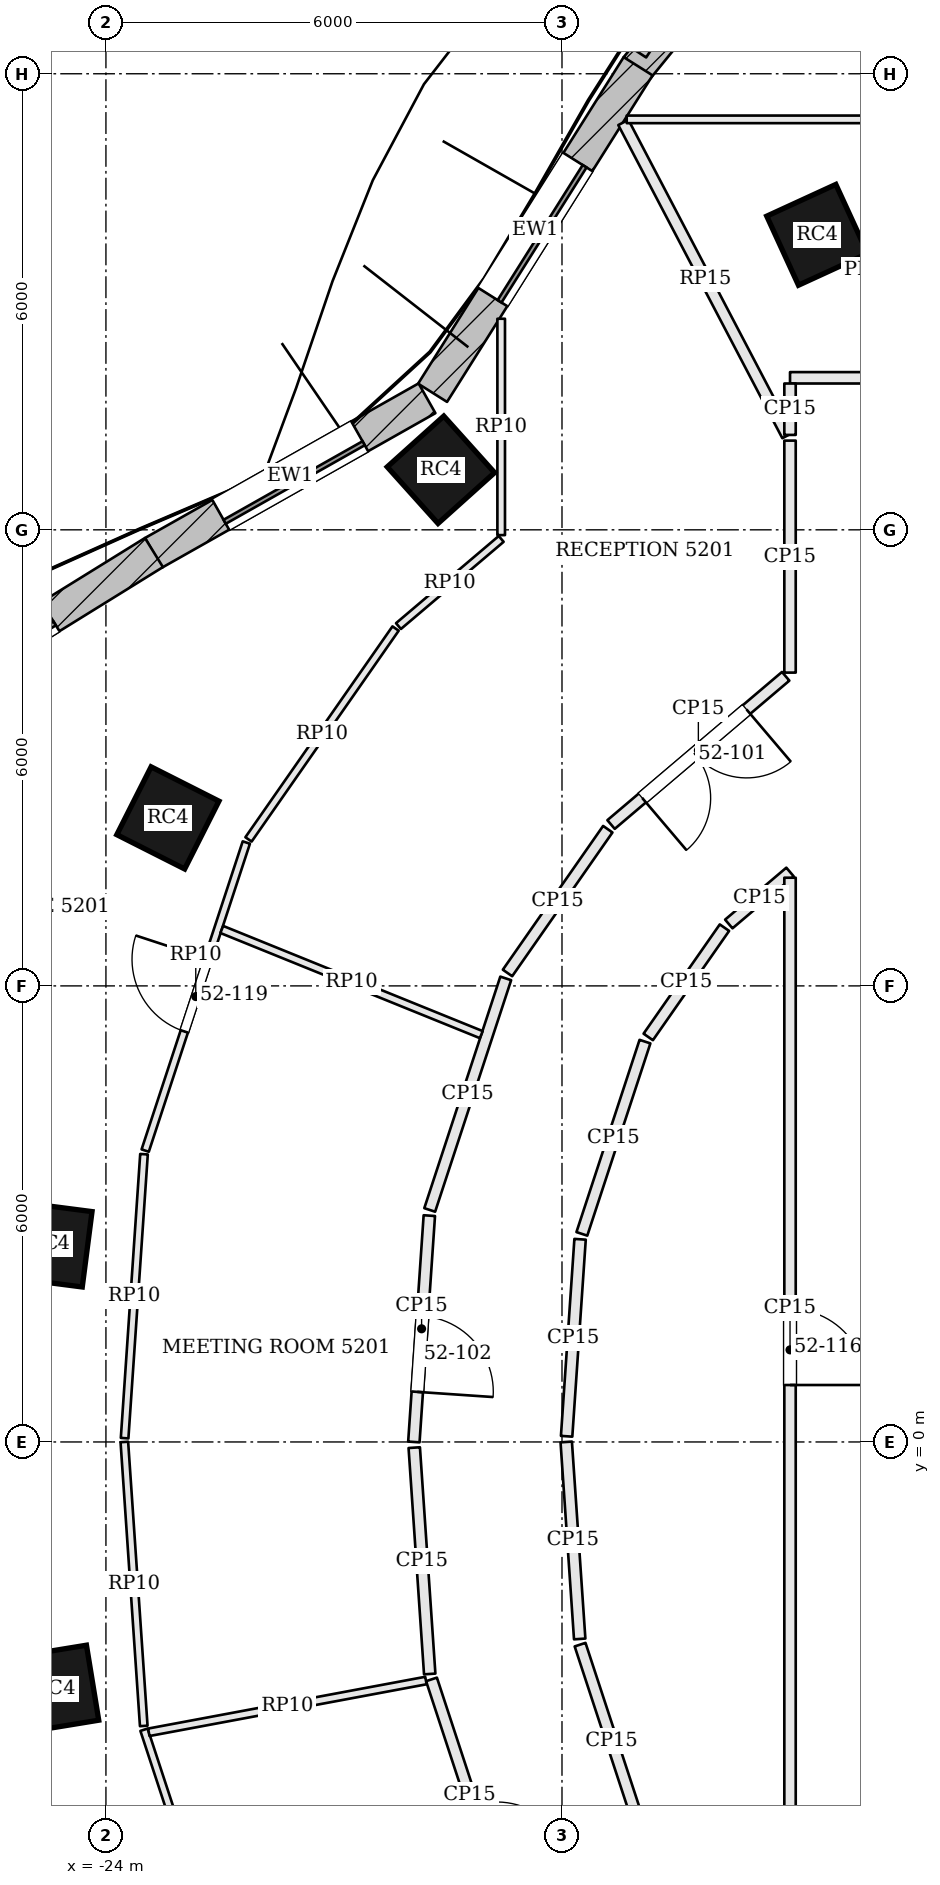
"""IFC4 building model, lengths in metres.
Left out: names, types, materials, properties, quantities, classifications, styles, units other than length and angle.
Written with IfcOpenShell. Run it as: python <this file> out.ifc"""

import sys

from ifc_helpers import new_model, si_unit, direction, frame, frame_2d, origin, origin_2d, place, context, subcontext, project, spatial, rectangle, extrude, element, fill, save


model = new_model("IFC4")
c1 = context("Model", 3, precision=1e-05, world=origin(), true_north=direction((0.0, 1.0)))
c2 = subcontext(c1, "Body", "Model", "MODEL_VIEW")
j1 = project(units=[si_unit("LENGTHUNIT", "METRE"), si_unit("PLANEANGLEUNIT", "RADIAN")], contexts=[c1])
p1 = place(None, origin())
s1 = spatial("IfcSite", under=j1, at=p1, CompositionType="ELEMENT")
p2 = place(p1, origin())
s2 = spatial("IfcBuilding", under=s1, at=p2, CompositionType="ELEMENT")
p3 = place(p2, frame((0.0, 0.0, 213.0)))
s3 = spatial("IfcBuildingStorey", under=s2, at=p3, CompositionType="ELEMENT", Elevation=213.0)
for number, where, z_axis, x_axis in (
    (1, (-14.643, 15.881, 0.0), (0.0, 0.0, 1.0), (-0.909, -0.417, 0.0)),
    (2, (-19.593, 12.79, 0.0), (0.0, 0.0, 1.0), (-0.744, -0.668, 0.0)),
    (3, (-23.185, 8.21, 0.0), (0.0, 0.0, 1.0), (-0.451, -0.893, 0.0)),
    (4, (-24.743, 2.599, 0.0), (0.0, 0.0, 1.0), (-0.128, -0.992, 0.0)),
    (5, (-24.669, -3.248, 0.0), (0.0, 0.0, 1.0), (0.162, -0.987, 0.0)),
):
    element("IfcColumn", number, at=place(p3, frame(where, z_axis=z_axis, x_axis=x_axis)), inside=s3, PredefinedType="COLUMN", context=c2, shape_type="SweptSolid", body=[
        extrude(rectangle(XDim=1.0, YDim=1.0, at=origin_2d()), origin(), (0.0, 0.0, 1.0), 3.9),
    ])
p4 = place(p3, frame((-14.926, 20.641, 0.0), z_axis=(0.0, 0.0, 1.0), x_axis=(-0.631548074669, -0.775336720001, 0.0)))
e6 = element("IfcWall", 6, at=p4, inside=s3, PredefinedType="SOLIDWALL", context=c2, shape_type="SweptSolid", body=[
    extrude(rectangle(XDim=3.308, YDim=0.45, at=frame_2d((1.654, 0.0))), origin(), (0.0, 0.0, 1.0), 3.6),
])
p5 = place(p4, frame((0.604, 0.0, 0.9)))
e7 = element("IfcOpeningElement", 7, at=p5, cuts=e6, PredefinedType="OPENING", context=c2, shape_type="SweptSolid", body=[
    extrude(rectangle(XDim=2.1, YDim=1.8, at=frame_2d((1.05, 0.9))), frame((0.0, 0.235, 0.0), z_axis=(0.0, -1.0, 0.0), x_axis=(1.0, 0.0, 0.0)), (0.0, 0.0, 1.0), 0.47),
])
p6 = place(p3, frame((-16.998, 18.099, 0.0), z_axis=(0.0, 0.0, 1.0), x_axis=(-0.532745661304, -0.846275404559, 0.0)))
e8 = element("IfcWall", 8, at=p6, inside=s3, PredefinedType="SOLIDWALL", context=c2, shape_type="SweptSolid", body=[
    extrude(rectangle(XDim=5.076, YDim=0.45, at=frame_2d((2.538, 0.0))), origin(), (0.0, 0.0, 1.0), 3.6),
])
p7 = place(p6, frame((1.488, 0.0, 0.9)))
e9 = element("IfcOpeningElement", 9, at=p7, cuts=e8, PredefinedType="OPENING", context=c2, shape_type="SweptSolid", body=[
    extrude(rectangle(XDim=2.1, YDim=1.8, at=frame_2d((1.05, 0.9))), frame((0.0, 0.235, 0.0), z_axis=(0.0, -1.0, 0.0), x_axis=(1.0, 0.0, 0.0)), (0.0, 0.0, 1.0), 0.47),
])
p8 = place(p3, frame((-19.776, 13.731, 0.0), z_axis=(0.0, 0.0, 1.0), x_axis=(-0.870610133829, -0.491973571318, 0.0)))
e10 = element("IfcWall", 10, at=p8, inside=s3, PredefinedType="SOLIDWALL", context=c2, shape_type="SweptSolid", body=[
    extrude(rectangle(XDim=4.134, YDim=0.45, at=frame_2d((2.067, 0.0))), origin(), (0.0, 0.0, 1.0), 3.6),
])
p9 = place(p8, frame((1.017, 0.0, 0.9)))
e11 = element("IfcOpeningElement", 11, at=p9, cuts=e10, PredefinedType="OPENING", context=c2, shape_type="SweptSolid", body=[
    extrude(rectangle(XDim=2.1, YDim=1.8, at=frame_2d((1.05, 0.9))), frame((0.0, 0.235, 0.0), z_axis=(0.0, -1.0, 0.0), x_axis=(1.0, 0.0, 0.0)), (0.0, 0.0, 1.0), 0.47),
])
p10 = place(p3, frame((-23.368, 11.701, 0.0), z_axis=(0.0, 0.0, 1.0), x_axis=(-0.850251408633, -0.526376806211, 0.0)))
e12 = element("IfcWall", 12, at=p10, inside=s3, PredefinedType="SOLIDWALL", context=c2, shape_type="SweptSolid", body=[
    extrude(rectangle(XDim=5.302, YDim=0.45, at=frame_2d((2.651, 0.0))), origin(), (0.0, 0.0, 1.0), 3.6),
])
p11 = place(p10, frame((1.601, 0.0, 0.9)))
e13 = element("IfcOpeningElement", 13, at=p11, cuts=e12, PredefinedType="OPENING", context=c2, shape_type="SweptSolid", body=[
    extrude(rectangle(XDim=2.1, YDim=1.8, at=frame_2d((1.05, 0.9))), frame((0.0, 0.235, 0.0), z_axis=(0.0, -1.0, 0.0), x_axis=(1.0, 0.0, 0.0)), (0.0, 0.0, 1.0), 0.47),
])
p12 = place(p3, frame((-16.838, 18.298, 0.0), z_axis=(0.0, 0.0, 1.0), x_axis=(-0.835871900419, 0.548924554097, 0.0)))
e14 = element("IfcWall", 14, at=p12, inside=s3, PredefinedType="SOLIDWALL", context=c2, shape_type="SweptSolid", body=[
    extrude(rectangle(XDim=1.75, YDim=0.2, at=frame_2d((0.875, 0.0))), origin(), (0.0, 0.0, 1.0), 3.6),
])
p13 = place(p3, frame((-15.0, 13.174, 0.0), z_axis=(0.0, 0.0, 1.0), x_axis=(0.0, -1.0, 0.0)))
e15 = element("IfcWall", 15, at=p13, inside=s3, PredefinedType="PARTITIONING", context=c2, shape_type="SweptSolid", body=[
    extrude(rectangle(XDim=3.052, YDim=0.15, at=frame_2d((1.526, 0.0))), origin(), (0.0, 0.0, 1.0), 2.984),
])
p14 = place(p3, frame((-15.057, 10.073, 0.0), z_axis=(0.0, 0.0, 1.0), x_axis=(-0.762398905861, -0.647107339119, 0.0)))
e16 = element("IfcWall", 16, at=p14, inside=s3, PredefinedType="PARTITIONING", context=c2, shape_type="SweptSolid", body=[
    extrude(rectangle(XDim=3.013, YDim=0.15, at=frame_2d((1.507, 0.0))), origin(), (0.0, 0.0, 1.0), 2.984),
])
p15 = place(p14, frame((0.675, 0.0, 0.0)))
e17 = element("IfcOpeningElement", 17, at=p15, cuts=e16, PredefinedType="OPENING", context=c2, shape_type="SweptSolid", body=[
    extrude(rectangle(XDim=1.8, YDim=2.1, at=frame_2d((0.9, 1.05))), frame((0.0, 0.085, 0.0), z_axis=(0.0, -1.0, 0.0), x_axis=(1.0, 0.0, 0.0)), (0.0, 0.0, 1.0), 0.17),
])
p16 = place(p3, frame((-17.397, 8.062, 0.0), z_axis=(0.0, 0.0, 1.0), x_axis=(-0.572118665737, -0.820170855563, 0.0)))
e18 = element("IfcWall", 18, at=p16, inside=s3, PredefinedType="PARTITIONING", context=c2, shape_type="SweptSolid", body=[
    extrude(rectangle(XDim=2.306, YDim=0.15, at=frame_2d((1.153, 0.0))), origin(), (0.0, 0.0, 1.0), 2.984),
])
p17 = place(p3, frame((-18.74, 6.099, 0.0), z_axis=(0.0, 0.0, 1.0), x_axis=(-0.31188427026, -0.950120098706, 0.0)))
e19 = element("IfcWall", 19, at=p17, inside=s3, PredefinedType="PARTITIONING", context=c2, shape_type="SweptSolid", body=[
    extrude(rectangle(XDim=3.206, YDim=0.15, at=frame_2d((1.603, 0.0))), origin(), (0.0, 0.0, 1.0), 2.984),
])
p18 = place(p3, frame((-19.745, 2.978, 0.0), z_axis=(0.0, 0.0, 1.0), x_axis=(-0.068142324, -0.997675610447, 0.0)))
e20 = element("IfcWall", 20, at=p18, inside=s3, PredefinedType="PARTITIONING", context=c2, shape_type="SweptSolid", body=[
    extrude(rectangle(XDim=2.984, YDim=0.15, at=frame_2d((1.492, 0.0))), origin(), (0.0, 0.0, 1.0), 2.984),
])
p19 = place(p18, frame((1.324, 0.0, 0.0)))
e21 = element("IfcOpeningElement", 21, at=p19, cuts=e20, PredefinedType="OPENING", context=c2, shape_type="SweptSolid", body=[
    extrude(rectangle(XDim=1.0, YDim=2.4, at=frame_2d((0.5, 1.2))), frame((0.0, 0.085, 0.0), z_axis=(0.0, -1.0, 0.0), x_axis=(1.0, 0.0, 0.0)), (0.0, 0.0, 1.0), 0.17),
])
p20 = place(p3, frame((-19.944, -0.075, 0.0), z_axis=(0.0, 0.0, 1.0), x_axis=(0.068136763128, -0.997675990245, 0.0)))
e22 = element("IfcWall", 22, at=p20, inside=s3, PredefinedType="PARTITIONING", context=c2, shape_type="SweptSolid", body=[
    extrude(rectangle(XDim=2.985, YDim=0.15, at=frame_2d((1.492, 0.0))), origin(), (0.0, 0.0, 1.0), 2.984),
])
p21 = place(p3, frame((-19.717, -3.124, 0.0), z_axis=(0.0, 0.0, 1.0), x_axis=(0.31188427026, -0.950120098706, 0.0)))
e23 = element("IfcWall", 23, at=p21, inside=s3, PredefinedType="PARTITIONING", context=c2, shape_type="SweptSolid", body=[
    extrude(rectangle(XDim=3.206, YDim=0.15, at=frame_2d((1.603, 0.0))), origin(), (0.0, 0.0, 1.0), 2.984),
])
p22 = place(p21, frame((1.75, 0.0, 0.0)))
e24 = element("IfcOpeningElement", 24, at=p22, cuts=e23, PredefinedType="OPENING", context=c2, shape_type="SweptSolid", body=[
    extrude(rectangle(XDim=1.0, YDim=2.4, at=frame_2d((0.5, 1.2))), frame((0.0, 0.085, 0.0), z_axis=(0.0, -1.0, 0.0), x_axis=(1.0, 0.0, 0.0)), (0.0, 0.0, 1.0), 0.17),
])
p23 = place(p3, frame((-17.193, 17.36, 0.0), z_axis=(0.0, 0.0, 1.0), x_axis=(0.463995225493, -0.885837699988, 0.0)))
e25 = element("IfcWall", 25, at=p23, inside=s3, PredefinedType="PARTITIONING", context=c2, shape_type="SweptSolid", body=[
    extrude(rectangle(XDim=4.651, YDim=0.15, at=frame_2d((2.325, 0.0))), origin(), (0.0, 0.0, 1.0), 3.084),
])
p24 = place(p3, frame((14.925, 14.0, 0.0), z_axis=(0.0, 0.0, 1.0), x_axis=(-1.0, 0.0, 0.0)))
e26 = element("IfcWall", 26, at=p24, inside=s3, PredefinedType="PARTITIONING", context=c2, shape_type="SweptSolid", body=[
    extrude(rectangle(XDim=29.925, YDim=0.15, at=frame_2d((14.962, 0.0))), origin(), (0.0, 0.0, 1.0), 2.984),
])
p25 = place(p24, frame((0.743, 0.0, 0.0)))
e27 = element("IfcOpeningElement", 27, at=p25, cuts=e26, PredefinedType="OPENING", context=c2, shape_type="SweptSolid", body=[
    extrude(rectangle(XDim=1.0, YDim=2.4, at=frame_2d((0.5, 1.2))), frame((0.0, 0.085, 0.0), z_axis=(0.0, -1.0, 0.0), x_axis=(1.0, 0.0, 0.0)), (0.0, 0.0, 1.0), 0.17),
])
p26 = place(p24, frame((6.984, 0.0, 0.0)))
e28 = element("IfcOpeningElement", 28, at=p26, cuts=e26, PredefinedType="OPENING", context=c2, shape_type="SweptSolid", body=[
    extrude(rectangle(XDim=1.0, YDim=2.4, at=frame_2d((0.5, 1.2))), frame((0.0, 0.085, 0.0), z_axis=(0.0, -1.0, 0.0), x_axis=(1.0, 0.0, 0.0)), (0.0, 0.0, 1.0), 0.17),
])
p27 = place(p24, frame((14.166, 0.0, 0.0)))
e29 = element("IfcOpeningElement", 29, at=p27, cuts=e26, PredefinedType="OPENING", context=c2, shape_type="SweptSolid", body=[
    extrude(rectangle(XDim=1.0, YDim=2.4, at=frame_2d((0.5, 1.2))), frame((0.0, 0.085, 0.0), z_axis=(0.0, -1.0, 0.0), x_axis=(1.0, 0.0, 0.0)), (0.0, 0.0, 1.0), 0.17),
])
p28 = place(p24, frame((20.45, 0.0, 0.0)))
e30 = element("IfcOpeningElement", 30, at=p28, cuts=e26, PredefinedType="OPENING", context=c2, shape_type="SweptSolid", body=[
    extrude(rectangle(XDim=1.0, YDim=2.1, at=frame_2d((0.5, 1.05))), frame((0.0, 0.085, 0.0), z_axis=(0.0, -1.0, 0.0), x_axis=(1.0, 0.0, 0.0)), (0.0, 0.0, 1.0), 0.17),
])
p29 = place(p24, frame((26.55, 0.0, 0.0)))
e31 = element("IfcOpeningElement", 31, at=p29, cuts=e26, PredefinedType="OPENING", context=c2, shape_type="SweptSolid", body=[
    extrude(rectangle(XDim=1.0, YDim=2.1, at=frame_2d((0.5, 1.05))), frame((0.0, 0.085, 0.0), z_axis=(0.0, -1.0, 0.0), x_axis=(1.0, 0.0, 0.0)), (0.0, 0.0, 1.0), 0.17),
])
p30 = place(p3, frame((-15.0, 13.925, 0.0), z_axis=(0.0, 0.0, 1.0), x_axis=(0.0, -1.0, 0.0)))
e32 = element("IfcWall", 32, at=p30, inside=s3, PredefinedType="PARTITIONING", context=c2, shape_type="SweptSolid", body=[
    extrude(rectangle(XDim=0.677, YDim=0.15, at=frame_2d((0.338, 0.0))), origin(), (0.0, 0.0, 1.0), 2.984),
])
p31 = place(p3, frame((-16.932, -5.196, 0.0), z_axis=(0.0, 0.0, 1.0), x_axis=(-0.311904957484, 0.950113307715, 0.0)))
e33 = element("IfcWall", 33, at=p31, inside=s3, PredefinedType="PARTITIONING", context=c2, shape_type="SweptSolid", body=[
    extrude(rectangle(XDim=2.662, YDim=0.15, at=frame_2d((1.331, 0.0))), origin(), (0.0, 0.0, 1.0), 2.984),
])
p32 = place(p3, frame((-17.767, -2.592, 0.0), z_axis=(0.0, 0.0, 1.0), x_axis=(-0.068140828228, 0.997675712608, 0.0)))
e34 = element("IfcWall", 34, at=p32, inside=s3, PredefinedType="PARTITIONING", context=c2, shape_type="SweptSolid", body=[
    extrude(rectangle(XDim=2.598, YDim=0.15, at=frame_2d((1.299, 0.0))), origin(), (0.0, 0.0, 1.0), 2.984),
])
p33 = place(p3, frame((-17.939, 0.075, 0.0), z_axis=(0.0, 0.0, 1.0), x_axis=(0.068227980697, 0.997669756307, 0.0)))
e35 = element("IfcWall", 35, at=p33, inside=s3, PredefinedType="PARTITIONING", context=c2, shape_type="SweptSolid", body=[
    extrude(rectangle(XDim=2.598, YDim=0.15, at=frame_2d((1.299, 0.0))), origin(), (0.0, 0.0, 1.0), 2.984),
])
p34 = place(p3, frame((-17.739, 2.738, 0.0), z_axis=(0.0, 0.0, 1.0), x_axis=(0.311904957484, 0.950113307715, 0.0)))
e36 = element("IfcWall", 36, at=p34, inside=s3, PredefinedType="PARTITIONING", context=c2, shape_type="SweptSolid", body=[
    extrude(rectangle(XDim=2.662, YDim=0.15, at=frame_2d((1.331, 0.0))), origin(), (0.0, 0.0, 1.0), 2.984),
])
p35 = place(p3, frame((-16.865, 5.329, 0.0), z_axis=(0.0, 0.0, 1.0), x_axis=(0.572096615639, 0.820186236397, 0.0)))
e37 = element("IfcWall", 37, at=p35, inside=s3, PredefinedType="PARTITIONING", context=c2, shape_type="SweptSolid", body=[
    extrude(rectangle(XDim=1.753, YDim=0.15, at=frame_2d((0.876, 0.0))), origin(), (0.0, 0.0, 1.0), 2.984),
])
p36 = place(p3, frame((-15.805, 6.814, 0.0), z_axis=(0.0, 0.0, 1.0), x_axis=(0.762298381233, 0.647225755027, 0.0)))
e38 = element("IfcWall", 38, at=p36, inside=s3, PredefinedType="PARTITIONING", context=c2, shape_type="SweptSolid", body=[
    extrude(rectangle(XDim=1.057, YDim=0.15, at=frame_2d((0.528, 0.0))), origin(), (0.0, 0.0, 1.0), 2.984),
])
p37 = place(p3, frame((-15.0, 7.423, 0.0), z_axis=(0.0, 0.0, 1.0), x_axis=(0.0, -1.0, 0.0)))
e39 = element("IfcWall", 39, at=p37, inside=s3, PredefinedType="PARTITIONING", context=c2, shape_type="SweptSolid", body=[
    extrude(rectangle(XDim=12.423, YDim=0.15, at=frame_2d((6.211, 0.0))), origin(), (0.0, 0.0, 1.0), 2.984),
])
p38 = place(p37, frame((5.674, 0.0, 0.0)))
e40 = element("IfcOpeningElement", 40, at=p38, cuts=e39, PredefinedType="OPENING", context=c2, shape_type="SweptSolid", body=[
    extrude(rectangle(XDim=1.0, YDim=2.4, at=frame_2d((0.5, 1.2))), frame((0.0, 0.085, 0.0), z_axis=(0.0, -1.0, 0.0), x_axis=(1.0, 0.0, 0.0)), (0.0, 0.0, 1.0), 0.17),
])
p39 = place(p3, frame((-22.169, -7.839, 0.0), z_axis=(0.0, 0.0, 1.0), x_axis=(-0.311880220566, 0.95012142804, 0.0)))
e41 = element("IfcWall", 41, at=p39, inside=s3, PredefinedType="PARTITIONING", context=c2, shape_type="SweptSolid", body=[
    extrude(rectangle(XDim=4.265, YDim=0.1, at=frame_2d((2.133, 0.0))), origin(), (0.0, 0.0, 1.0), 2.984),
])
p40 = place(p3, frame((-23.502, -3.736, 0.0), z_axis=(0.0, 0.0, 1.0), x_axis=(-0.068197929309, 0.997671810987, 0.0)))
e42 = element("IfcWall", 42, at=p40, inside=s3, PredefinedType="PARTITIONING", context=c2, shape_type="SweptSolid", body=[
    extrude(rectangle(XDim=3.745, YDim=0.1, at=frame_2d((1.872, 0.0))), origin(), (0.0, 0.0, 1.0), 2.984),
])
p41 = place(p3, frame((-23.754, 0.05, 0.0), z_axis=(0.0, 0.0, 1.0), x_axis=(0.068193493527, 0.997672114194, 0.0)))
e43 = element("IfcWall", 43, at=p41, inside=s3, PredefinedType="PARTITIONING", context=c2, shape_type="SweptSolid", body=[
    extrude(rectangle(XDim=3.745, YDim=0.1, at=frame_2d((1.873, 0.0))), origin(), (0.0, 0.0, 1.0), 2.984),
])
p42 = place(p3, frame((-23.483, 3.833, 0.0), z_axis=(0.0, 0.0, 1.0), x_axis=(0.311880220566, 0.95012142804, 0.0)))
e44 = element("IfcWall", 44, at=p42, inside=s3, PredefinedType="PARTITIONING", context=c2, shape_type="SweptSolid", body=[
    extrude(rectangle(XDim=4.265, YDim=0.1, at=frame_2d((2.133, 0.0))), origin(), (0.0, 0.0, 1.0), 2.984),
])
p43 = place(p42, frame((1.65, 0.0, 0.0)))
e45 = element("IfcOpeningElement", 45, at=p43, cuts=e44, PredefinedType="OPENING", context=c2, shape_type="SweptSolid", body=[
    extrude(rectangle(XDim=1.0, YDim=2.4, at=frame_2d((0.5, 1.2))), frame((0.0, 0.06, 0.0), z_axis=(0.0, -1.0, 0.0), x_axis=(1.0, 0.0, 0.0)), (0.0, 0.0, 1.0), 0.12),
])
p44 = place(p3, frame((-22.125, 7.927, 0.0), z_axis=(0.0, 0.0, 1.0), x_axis=(0.572100301866, 0.820183665166, 0.0)))
e46 = element("IfcWall", 46, at=p44, inside=s3, PredefinedType="PARTITIONING", context=c2, shape_type="SweptSolid", body=[
    extrude(rectangle(XDim=3.382, YDim=0.1, at=frame_2d((1.691, 0.0))), origin(), (0.0, 0.0, 1.0), 2.984),
])
p45 = place(p3, frame((-20.151, 10.734, 0.0), z_axis=(0.0, 0.0, 1.0), x_axis=(0.762465888028, 0.647028414827, 0.0)))
e47 = element("IfcWall", 47, at=p45, inside=s3, PredefinedType="PARTITIONING", context=c2, shape_type="SweptSolid", body=[
    extrude(rectangle(XDim=1.772, YDim=0.1, at=frame_2d((0.886, 0.0))), origin(), (0.0, 0.0, 1.0), 2.984),
])
p46 = place(p3, frame((-18.8, 11.93, 0.0), z_axis=(0.0, 0.0, 1.0), x_axis=(0.0, 1.0, 0.0)))
e48 = element("IfcWall", 48, at=p46, inside=s3, PredefinedType="PARTITIONING", context=c2, shape_type="SweptSolid", body=[
    extrude(rectangle(XDim=2.846, YDim=0.1, at=frame_2d((1.423, 0.0))), origin(), (0.0, 0.0, 1.0), 2.984),
])
p47 = place(p3, frame((-19.062, 5.359, 0.0), z_axis=(0.0, 0.0, 1.0), x_axis=(-0.926789776873, 0.375580496677, 0.0)))
e49 = element("IfcWall", 49, at=p47, inside=s3, PredefinedType="PARTITIONING", context=c2, shape_type="SweptSolid", body=[
    extrude(rectangle(XDim=3.684, YDim=0.1, at=frame_2d((1.842, 0.0))), origin(), (0.0, 0.0, 1.0), 2.984),
])
p48 = place(p3, frame((-19.79, -3.139, 0.0), z_axis=(0.0, 0.0, 1.0), x_axis=(-0.983000134823, -0.183604833647, 0.0)))
e50 = element("IfcWall", 50, at=p48, inside=s3, PredefinedType="PARTITIONING", context=c2, shape_type="SweptSolid", body=[
    extrude(rectangle(XDim=3.708, YDim=0.1, at=frame_2d((1.854, 0.0))), origin(), (0.0, 0.0, 1.0), 2.984),
])
p49 = place(p3, frame((-17.149, 17.4, 0.0), z_axis=(0.0, 0.0, 1.0), x_axis=(1.0, 0.0, 0.0)))
e51 = element("IfcWall", 51, at=p49, inside=s3, PredefinedType="PARTITIONING", context=c2, shape_type="SweptSolid", body=[
    extrude(rectangle(XDim=7.602, YDim=0.1, at=frame_2d((3.801, 0.0))), origin(), (0.0, 0.0, 1.0), 2.984),
])
p50 = place(p49, frame((3.668, 0.0, 0.0)))
e52 = element("IfcOpeningElement", 52, at=p50, cuts=e51, PredefinedType="OPENING", context=c2, shape_type="SweptSolid", body=[
    extrude(rectangle(XDim=0.9, YDim=2.1, at=frame_2d((0.45, 1.05))), frame((0.0, 0.06, 0.0), z_axis=(0.0, -1.0, 0.0), x_axis=(1.0, 0.0, 0.0)), (0.0, 0.0, 1.0), 0.12),
])
p51 = place(p7, origin())
e53 = element("IfcWindow", 53, at=p51, inside=s3, PartitioningType="SINGLE_PANEL", PredefinedType="WINDOW", context=c2, shape_type="SweptSolid", body=[
    extrude(rectangle(XDim=2.1, YDim=1.8, at=frame_2d((1.05, 0.9))), frame((0.0, 0.135, 0.0), z_axis=(0.0, -1.0, 0.0), x_axis=(1.0, 0.0, 0.0)), (0.0, 0.0, 1.0), 0.06),
])
fill(e9, e53)
p52 = place(p9, origin())
e54 = element("IfcWindow", 54, at=p52, inside=s3, PartitioningType="SINGLE_PANEL", PredefinedType="WINDOW", context=c2, shape_type="SweptSolid", body=[
    extrude(rectangle(XDim=2.1, YDim=1.8, at=frame_2d((1.05, 0.9))), frame((0.0, 0.135, 0.0), z_axis=(0.0, -1.0, 0.0), x_axis=(1.0, 0.0, 0.0)), (0.0, 0.0, 1.0), 0.06),
])
fill(e11, e54)
p53 = place(p11, origin())
e55 = element("IfcWindow", 55, at=p53, inside=s3, PartitioningType="SINGLE_PANEL", PredefinedType="WINDOW", context=c2, shape_type="SweptSolid", body=[
    extrude(rectangle(XDim=2.1, YDim=1.8, at=frame_2d((1.05, 0.9))), frame((0.0, 0.135, 0.0), z_axis=(0.0, -1.0, 0.0), x_axis=(1.0, 0.0, 0.0)), (0.0, 0.0, 1.0), 0.06),
])
fill(e13, e55)
p54 = place(p15, origin())
e56 = element("IfcDoor", 56, at=p54, inside=s3, OperationType="DOUBLE_DOOR_SINGLE_SWING", PredefinedType="DOOR", context=c2, shape_type="SweptSolid", body=[
    extrude(rectangle(XDim=1.8, YDim=2.1, at=frame_2d((0.9, 1.05))), frame((0.0, 0.025, 0.0), z_axis=(0.0, -1.0, 0.0), x_axis=(1.0, 0.0, 0.0)), (0.0, 0.0, 1.0), 0.05),
])
fill(e17, e56)
p55 = place(p19, origin())
e57 = element("IfcDoor", 57, at=p55, inside=s3, OperationType="SINGLE_SWING_RIGHT", PredefinedType="DOOR", context=c2, shape_type="SweptSolid", body=[
    extrude(rectangle(XDim=1.0, YDim=2.4, at=frame_2d((0.5, 1.2))), frame((0.0, 0.025, 0.0), z_axis=(0.0, -1.0, 0.0), x_axis=(1.0, 0.0, 0.0)), (0.0, 0.0, 1.0), 0.05),
])
fill(e21, e57)
p56 = place(p38, origin())
e58 = element("IfcDoor", 58, at=p56, inside=s3, OperationType="SINGLE_SWING_RIGHT", PredefinedType="DOOR", context=c2, shape_type="SweptSolid", body=[
    extrude(rectangle(XDim=1.0, YDim=2.4, at=frame_2d((0.5, 1.2))), frame((0.0, 0.025, 0.0), z_axis=(0.0, -1.0, 0.0), x_axis=(1.0, 0.0, 0.0)), (0.0, 0.0, 1.0), 0.05),
])
fill(e40, e58)
p57 = place(p43, origin())
e59 = element("IfcDoor", 59, at=p57, inside=s3, OperationType="SINGLE_SWING_RIGHT", PredefinedType="DOOR", context=c2, shape_type="SweptSolid", body=[
    extrude(rectangle(XDim=1.0, YDim=2.4, at=frame_2d((0.5, 1.2))), frame((0.0, 0.025, 0.0), z_axis=(0.0, -1.0, 0.0), x_axis=(1.0, 0.0, 0.0)), (0.0, 0.0, 1.0), 0.05),
])
fill(e45, e59)
save(model, sys.argv[1])
